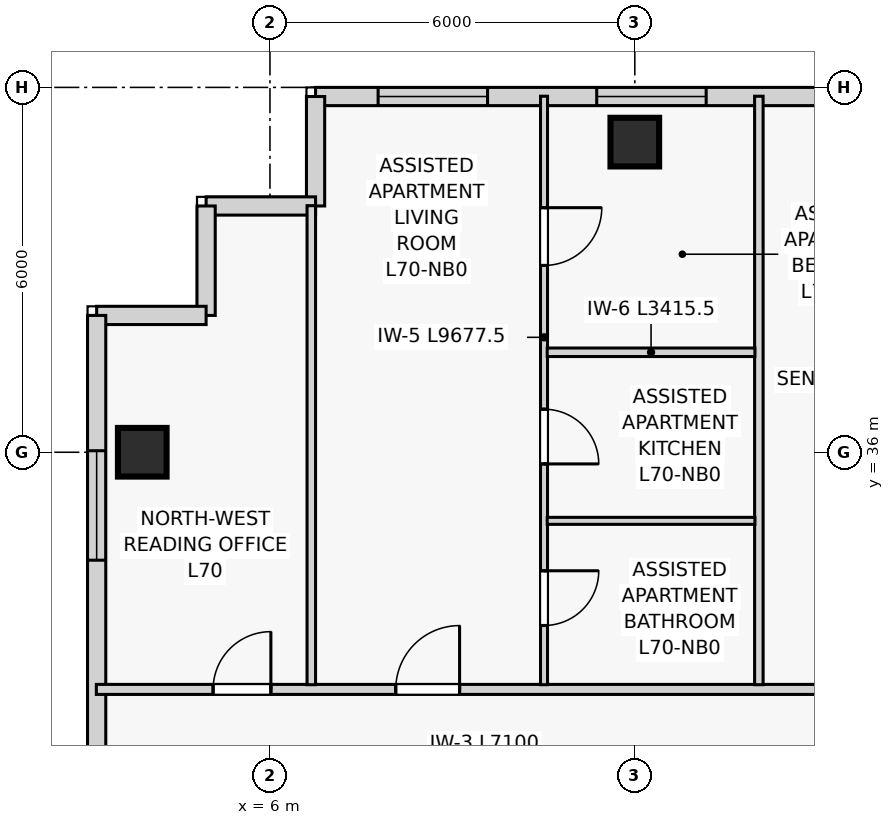
"""IFC4 building model, lengths in metres.
Left out: names, types, materials, properties, quantities, classifications, styles, units other than length and angle.
Written with IfcOpenShell. Run it as: python <this file> out.ifc"""

import sys

from ifc_helpers import new_model, si_unit, direction, frame, frame_2d, origin, origin_2d, place, context, subcontext, project, spatial, rectangle, extrude, source, transform, mapped, element, fill, save


model = new_model("IFC4")
c1 = context("Model", 3, precision=1e-05, world=origin(), true_north=direction((0.0, 1.0)))
c2 = subcontext(c1, "Body", "Model", "MODEL_VIEW")
j1 = project(units=[si_unit("LENGTHUNIT", "METRE"), si_unit("PLANEANGLEUNIT", "RADIAN")], contexts=[c1])
p1 = place(None, origin())
s1 = spatial("IfcSite", under=j1, at=p1, CompositionType="ELEMENT")
p2 = place(p1, origin())
s2 = spatial("IfcBuilding", under=s1, at=p2, CompositionType="ELEMENT")
p3 = place(p2, frame((0.0, 0.0, 267.3)))
s3 = spatial("IfcBuildingStorey", under=s2, at=p3, CompositionType="ELEMENT", Elevation=267.3)
m1 = source(origin(), c2, "Body", "SweptSolid", [
    extrude(rectangle(XDim=0.8, YDim=0.8, at=origin_2d()), origin(), (0.0, 0.0, 1.0), 3.6),
])
for number, where, z_axis, x_axis in (
    (1, (12.0, 41.1, 0.0), (0.0, 0.0, 1.0), (1.0, 0.0, 0.0)),
    (2, (3.9, 36.0, 0.0), (0.0, 0.0, 1.0), (1.0, 0.0, 0.0)),
):
    element("IfcColumn", number, at=place(p3, frame(where, z_axis=z_axis, x_axis=x_axis)), inside=s3, PredefinedType="COLUMN", context=c2, shape_type="MappedRepresentation", body=[
        mapped(m1, transform((0.0, 0.0, 0.0), scale=1.0)),
    ])
p4 = place(p3, frame((18.167, 41.85, 0.0), z_axis=(0.0, 0.0, 1.0), x_axis=(-1.0, 0.0, 0.0)))
e3 = element("IfcWall", 3, at=p4, inside=s3, PredefinedType="SOLIDWALL", context=c2, shape_type="SweptSolid", body=[
    extrude(rectangle(XDim=11.417, YDim=0.3, at=frame_2d((5.708, 0.0))), origin(), (0.0, 0.0, 1.0), 3.32),
])
p5 = place(p4, frame((1.213, 0.0, 0.8)))
e4 = element("IfcOpeningElement", 4, at=p5, cuts=e3, PredefinedType="OPENING", context=c2, shape_type="SweptSolid", body=[
    extrude(rectangle(XDim=1.8, YDim=2.1, at=frame_2d((0.9, 1.05))), frame((0.0, 0.16, 0.0), z_axis=(0.0, -1.0, 0.0), x_axis=(1.0, 0.0, 0.0)), (0.0, 0.0, 1.0), 0.32),
])
p6 = place(p4, frame((4.993, 0.0, 0.8)))
e5 = element("IfcOpeningElement", 5, at=p6, cuts=e3, PredefinedType="OPENING", context=c2, shape_type="SweptSolid", body=[
    extrude(rectangle(XDim=1.8, YDim=2.1, at=frame_2d((0.9, 1.05))), frame((0.0, 0.16, 0.0), z_axis=(0.0, -1.0, 0.0), x_axis=(1.0, 0.0, 0.0)), (0.0, 0.0, 1.0), 0.32),
])
p7 = place(p4, frame((8.588, 0.0, 0.8)))
e6 = element("IfcOpeningElement", 6, at=p7, cuts=e3, PredefinedType="OPENING", context=c2, shape_type="SweptSolid", body=[
    extrude(rectangle(XDim=1.8, YDim=2.1, at=frame_2d((0.9, 1.05))), frame((0.0, 0.16, 0.0), z_axis=(0.0, -1.0, 0.0), x_axis=(1.0, 0.0, 0.0)), (0.0, 0.0, 1.0), 0.32),
])
for number, where, z_axis, x_axis in (
    (7, (6.75, 41.85, 0.0), (0.0, 0.0, 1.0), (0.0, -1.0, 0.0)),
    (8, (6.75, 40.05, 0.0), (0.0, 0.0, 1.0), (-1.0, 0.0, 0.0)),
    (9, (4.95, 40.05, 0.0), (0.0, 0.0, 1.0), (0.0, -1.0, 0.0)),
    (10, (4.95, 38.25, 0.0), (0.0, 0.0, 1.0), (-1.0, 0.0, 0.0)),
):
    element("IfcWall", number, at=place(p3, frame(where, z_axis=z_axis, x_axis=x_axis)), inside=s3, PredefinedType="SOLIDWALL", context=c2, shape_type="SweptSolid", body=[
        extrude(rectangle(XDim=1.8, YDim=0.3, at=frame_2d((0.9, 0.0))), origin(), (0.0, 0.0, 1.0), 3.32),
    ])
p8 = place(p3, frame((3.15, 38.25, 0.0), z_axis=(0.0, 0.0, 1.0), x_axis=(0.0, -1.0, 0.0)))
e11 = element("IfcWall", 11, at=p8, inside=s3, PredefinedType="SOLIDWALL", context=c2, shape_type="SweptSolid", body=[
    extrude(rectangle(XDim=10.71, YDim=0.3, at=frame_2d((5.355, 0.0))), origin(), (0.0, 0.0, 1.0), 3.32),
])
p9 = place(p8, frame((2.225, 0.0, 0.8)))
e12 = element("IfcOpeningElement", 12, at=p9, cuts=e11, PredefinedType="OPENING", context=c2, shape_type="SweptSolid", body=[
    extrude(rectangle(XDim=1.8, YDim=2.1, at=frame_2d((0.9, 1.05))), frame((0.0, 0.16, 0.0), z_axis=(0.0, -1.0, 0.0), x_axis=(1.0, 0.0, 0.0)), (0.0, 0.0, 1.0), 0.32),
])
p10 = place(p8, frame((7.48, 0.0, 0.8)))
e13 = element("IfcOpeningElement", 13, at=p10, cuts=e11, PredefinedType="OPENING", context=c2, shape_type="SweptSolid", body=[
    extrude(rectangle(XDim=1.8, YDim=2.1, at=frame_2d((0.9, 1.05))), frame((0.0, 0.16, 0.0), z_axis=(0.0, -1.0, 0.0), x_axis=(1.0, 0.0, 0.0)), (0.0, 0.0, 1.0), 0.32),
])
p11 = place(p3, frame((3.145, 32.1, 0.0), z_axis=(0.0, 0.0, 1.0), x_axis=(1.0, 0.0, 0.0)))
e14 = element("IfcWall", 14, at=p11, inside=s3, PredefinedType="PARTITIONING", context=c2, shape_type="SweptSolid", body=[
    extrude(rectangle(XDim=38.71, YDim=0.165, at=frame_2d((19.355, 0.0))), origin(), (0.0, 0.0, 1.0), 3.32),
])
p12 = place(p11, frame((4.924, 0.0, 0.0)))
e15 = element("IfcOpeningElement", 15, at=p12, cuts=e14, PredefinedType="OPENING", context=c2, shape_type="SweptSolid", body=[
    extrude(rectangle(XDim=1.05, YDim=2.15, at=frame_2d((0.525, 1.075))), frame((0.0, 0.093, 0.0), z_axis=(0.0, -1.0, 0.0), x_axis=(1.0, 0.0, 0.0)), (0.0, 0.0, 1.0), 0.185),
])
p13 = place(p11, frame((12.434, 0.0, 0.0)))
e16 = element("IfcOpeningElement", 16, at=p13, cuts=e14, PredefinedType="OPENING", context=c2, shape_type="SweptSolid", body=[
    extrude(rectangle(XDim=1.05, YDim=2.15, at=frame_2d((0.525, 1.075))), frame((0.0, 0.093, 0.0), z_axis=(0.0, -1.0, 0.0), x_axis=(1.0, 0.0, 0.0)), (0.0, 0.0, 1.0), 0.185),
])
p14 = place(p11, frame((20.505, 0.0, 0.0)))
e17 = element("IfcOpeningElement", 17, at=p14, cuts=e14, PredefinedType="OPENING", context=c2, shape_type="SweptSolid", body=[
    extrude(rectangle(XDim=1.2, YDim=2.2, at=frame_2d((0.6, 1.1))), frame((0.0, 0.093, 0.0), z_axis=(0.0, -1.0, 0.0), x_axis=(1.0, 0.0, 0.0)), (0.0, 0.0, 1.0), 0.185),
])
p15 = place(p11, frame((25.55, 0.0, 0.0)))
e18 = element("IfcOpeningElement", 18, at=p15, cuts=e14, PredefinedType="OPENING", context=c2, shape_type="SweptSolid", body=[
    extrude(rectangle(XDim=1.25, YDim=2.2, at=frame_2d((0.625, 1.1))), frame((0.0, 0.093, 0.0), z_axis=(0.0, -1.0, 0.0), x_axis=(1.0, 0.0, 0.0)), (0.0, 0.0, 1.0), 0.185),
])
p16 = place(p11, frame((32.49, 0.0, 0.0)))
e19 = element("IfcOpeningElement", 19, at=p16, cuts=e14, PredefinedType="OPENING", context=c2, shape_type="SweptSolid", body=[
    extrude(rectangle(XDim=0.95, YDim=2.1, at=frame_2d((0.475, 1.05))), frame((0.0, 0.093, 0.0), z_axis=(0.0, -1.0, 0.0), x_axis=(1.0, 0.0, 0.0)), (0.0, 0.0, 1.0), 0.185),
])
p17 = place(p11, frame((1.92, 0.0, 0.0)))
e20 = element("IfcOpeningElement", 20, at=p17, cuts=e14, PredefinedType="OPENING", context=c2, shape_type="SweptSolid", body=[
    extrude(rectangle(XDim=0.95, YDim=2.1, at=frame_2d((0.475, 1.05))), frame((0.0, 0.093, 0.0), z_axis=(0.0, -1.0, 0.0), x_axis=(1.0, 0.0, 0.0)), (0.0, 0.0, 1.0), 0.185),
])
p18 = place(p11, frame((35.84, 0.0, 0.0)))
e21 = element("IfcOpeningElement", 21, at=p18, cuts=e14, PredefinedType="OPENING", context=c2, shape_type="SweptSolid", body=[
    extrude(rectangle(XDim=0.95, YDim=2.1, at=frame_2d((0.475, 1.05))), frame((0.0, 0.093, 0.0), z_axis=(0.0, -1.0, 0.0), x_axis=(1.0, 0.0, 0.0)), (0.0, 0.0, 1.0), 0.185),
])
p19 = place(p3, frame((6.68, 32.177, 0.0), z_axis=(0.0, 0.0, 1.0), x_axis=(0.0, 1.0, 0.0)))
e22 = element("IfcWall", 22, at=p19, inside=s3, PredefinedType="PARTITIONING", context=c2, shape_type="SweptSolid", body=[
    extrude(rectangle(XDim=7.877, YDim=0.14, at=frame_2d((3.939, 0.0))), origin(), (0.0, 0.0, 1.0), 3.32),
])
p20 = place(p3, frame((14.04, 32.177, 0.0), z_axis=(0.0, 0.0, 1.0), x_axis=(0.0, 1.0, 0.0)))
e23 = element("IfcWall", 23, at=p20, inside=s3, PredefinedType="PARTITIONING", context=c2, shape_type="SweptSolid", body=[
    extrude(rectangle(XDim=9.677, YDim=0.14, at=frame_2d((4.839, 0.0))), origin(), (0.0, 0.0, 1.0), 3.32),
])
p21 = place(p3, frame((10.507, 32.177, 0.0), z_axis=(0.0, 0.0, 1.0), x_axis=(0.0, 1.0, 0.0)))
e24 = element("IfcWall", 24, at=p21, inside=s3, PredefinedType="PARTITIONING", context=c2, shape_type="SweptSolid", body=[
    extrude(rectangle(XDim=9.677, YDim=0.115, at=frame_2d((4.839, 0.0))), origin(), (0.0, 0.0, 1.0), 3.32),
])
p22 = place(p21, frame((6.895, 0.0, 0.0)))
e25 = element("IfcOpeningElement", 25, at=p22, cuts=e24, PredefinedType="OPENING", context=c2, shape_type="SweptSolid", body=[
    extrude(rectangle(XDim=0.95, YDim=2.1, at=frame_2d((0.475, 1.05))), frame((0.0, 0.067, 0.0), z_axis=(0.0, -1.0, 0.0), x_axis=(1.0, 0.0, 0.0)), (0.0, 0.0, 1.0), 0.135),
])
p23 = place(p21, frame((3.631, 0.0, 0.0)))
e26 = element("IfcOpeningElement", 26, at=p23, cuts=e24, PredefinedType="OPENING", context=c2, shape_type="SweptSolid", body=[
    extrude(rectangle(XDim=0.9, YDim=2.1, at=frame_2d((0.45, 1.05))), frame((0.0, 0.067, 0.0), z_axis=(0.0, -1.0, 0.0), x_axis=(1.0, 0.0, 0.0)), (0.0, 0.0, 1.0), 0.135),
])
p24 = place(p21, frame((0.973, 0.0, 0.0)))
e27 = element("IfcOpeningElement", 27, at=p24, cuts=e24, PredefinedType="OPENING", context=c2, shape_type="SweptSolid", body=[
    extrude(rectangle(XDim=0.9, YDim=2.1, at=frame_2d((0.45, 1.05))), frame((0.0, 0.067, 0.0), z_axis=(0.0, -1.0, 0.0), x_axis=(1.0, 0.0, 0.0)), (0.0, 0.0, 1.0), 0.135),
])
p25 = place(p3, frame((10.56, 37.644, 0.0), z_axis=(0.0, 0.0, 1.0), x_axis=(1.0, 0.0, 0.0)))
e28 = element("IfcWall", 28, at=p25, inside=s3, PredefinedType="PLUMBINGWALL", context=c2, shape_type="SweptSolid", body=[
    extrude(rectangle(XDim=3.416, YDim=0.14, at=frame_2d((1.708, 0.0))), origin(), (0.0, 0.0, 1.0), 3.32),
])
p26 = place(p3, frame((10.56, 34.872, 0.0), z_axis=(0.0, 0.0, 1.0), x_axis=(1.0, 0.0, 0.0)))
e29 = element("IfcWall", 29, at=p26, inside=s3, PredefinedType="PARTITIONING", context=c2, shape_type="SweptSolid", body=[
    extrude(rectangle(XDim=3.416, YDim=0.115, at=frame_2d((1.708, 0.0))), origin(), (0.0, 0.0, 1.0), 3.32),
])
m2 = source(origin(), c2, "Body", "SweptSolid", [
    extrude(rectangle(XDim=1.8, YDim=2.1, at=frame_2d((0.9, 1.05))), frame((0.0, 0.03, 0.0), z_axis=(0.0, -1.0, 0.0), x_axis=(1.0, 0.0, 0.0)), (0.0, 0.0, 1.0), 0.06),
])
p27 = place(p6, origin())
e30 = element("IfcWindow", 30, at=p27, inside=s3, PartitioningType="SINGLE_PANEL", PredefinedType="WINDOW", context=c2, shape_type="MappedRepresentation", body=[
    mapped(m2, transform((0.0, 0.0, 0.0), scale=1.0)),
])
fill(e5, e30)
p28 = place(p7, origin())
e31 = element("IfcWindow", 31, at=p28, inside=s3, PartitioningType="SINGLE_PANEL", PredefinedType="WINDOW", context=c2, shape_type="MappedRepresentation", body=[
    mapped(m2, transform((0.0, 0.0, 0.0), scale=1.0)),
])
fill(e6, e31)
p29 = place(p9, origin())
e32 = element("IfcWindow", 32, at=p29, inside=s3, PartitioningType="SINGLE_PANEL", PredefinedType="WINDOW", context=c2, shape_type="MappedRepresentation", body=[
    mapped(m2, transform((0.0, 0.0, 0.0), scale=1.0)),
])
fill(e12, e32)
m3 = source(origin(), c2, "Body", "SweptSolid", [
    extrude(rectangle(XDim=1.05, YDim=2.15, at=frame_2d((0.525, 1.075))), frame((0.0, 0.025, 0.0), z_axis=(0.0, -1.0, 0.0), x_axis=(1.0, 0.0, 0.0)), (0.0, 0.0, 1.0), 0.05),
])
p30 = place(p12, origin())
e33 = element("IfcDoor", 33, at=p30, inside=s3, OperationType="SINGLE_SWING_RIGHT", PredefinedType="DOOR", context=c2, shape_type="MappedRepresentation", body=[
    mapped(m3, transform((0.0, 0.0, 0.0), scale=1.0)),
])
fill(e15, e33)
m4 = source(origin(), c2, "Body", "SweptSolid", [
    extrude(rectangle(XDim=0.95, YDim=2.1, at=frame_2d((0.475, 1.05))), frame((0.0, 0.025, 0.0), z_axis=(0.0, -1.0, 0.0), x_axis=(1.0, 0.0, 0.0)), (0.0, 0.0, 1.0), 0.05),
])
p31 = place(p22, frame((0.95, 0.0, 0.0), z_axis=(0.0, 0.0, 1.0), x_axis=(-1.0, 0.0, 0.0)))
e34 = element("IfcDoor", 34, at=p31, inside=s3, OperationType="SINGLE_SWING_LEFT", PredefinedType="DOOR", context=c2, shape_type="MappedRepresentation", body=[
    mapped(m4, transform((0.0, 0.0, 0.0), scale=1.0)),
])
fill(e25, e34)
m5 = source(origin(), c2, "Body", "SweptSolid", [
    extrude(rectangle(XDim=0.9, YDim=2.1, at=frame_2d((0.45, 1.05))), frame((0.0, 0.025, 0.0), z_axis=(0.0, -1.0, 0.0), x_axis=(1.0, 0.0, 0.0)), (0.0, 0.0, 1.0), 0.05),
])
p32 = place(p23, frame((0.9, 0.0, 0.0), z_axis=(0.0, 0.0, 1.0), x_axis=(-1.0, 0.0, 0.0)))
e35 = element("IfcDoor", 35, at=p32, inside=s3, OperationType="SINGLE_SWING_RIGHT", PredefinedType="DOOR", context=c2, shape_type="MappedRepresentation", body=[
    mapped(m5, transform((0.0, 0.0, 0.0), scale=1.0)),
])
fill(e26, e35)
p33 = place(p24, frame((0.9, 0.0, 0.0), z_axis=(0.0, 0.0, 1.0), x_axis=(-1.0, 0.0, 0.0)))
e36 = element("IfcDoor", 36, at=p33, inside=s3, OperationType="SINGLE_SWING_LEFT", PredefinedType="DOOR", context=c2, shape_type="MappedRepresentation", body=[
    mapped(m5, transform((0.0, 0.0, 0.0), scale=1.0)),
])
fill(e27, e36)
p34 = place(p17, origin())
e37 = element("IfcDoor", 37, at=p34, inside=s3, OperationType="SINGLE_SWING_RIGHT", PredefinedType="DOOR", context=c2, shape_type="MappedRepresentation", body=[
    mapped(m4, transform((0.0, 0.0, 0.0), scale=1.0)),
])
fill(e20, e37)
save(model, sys.argv[1])
